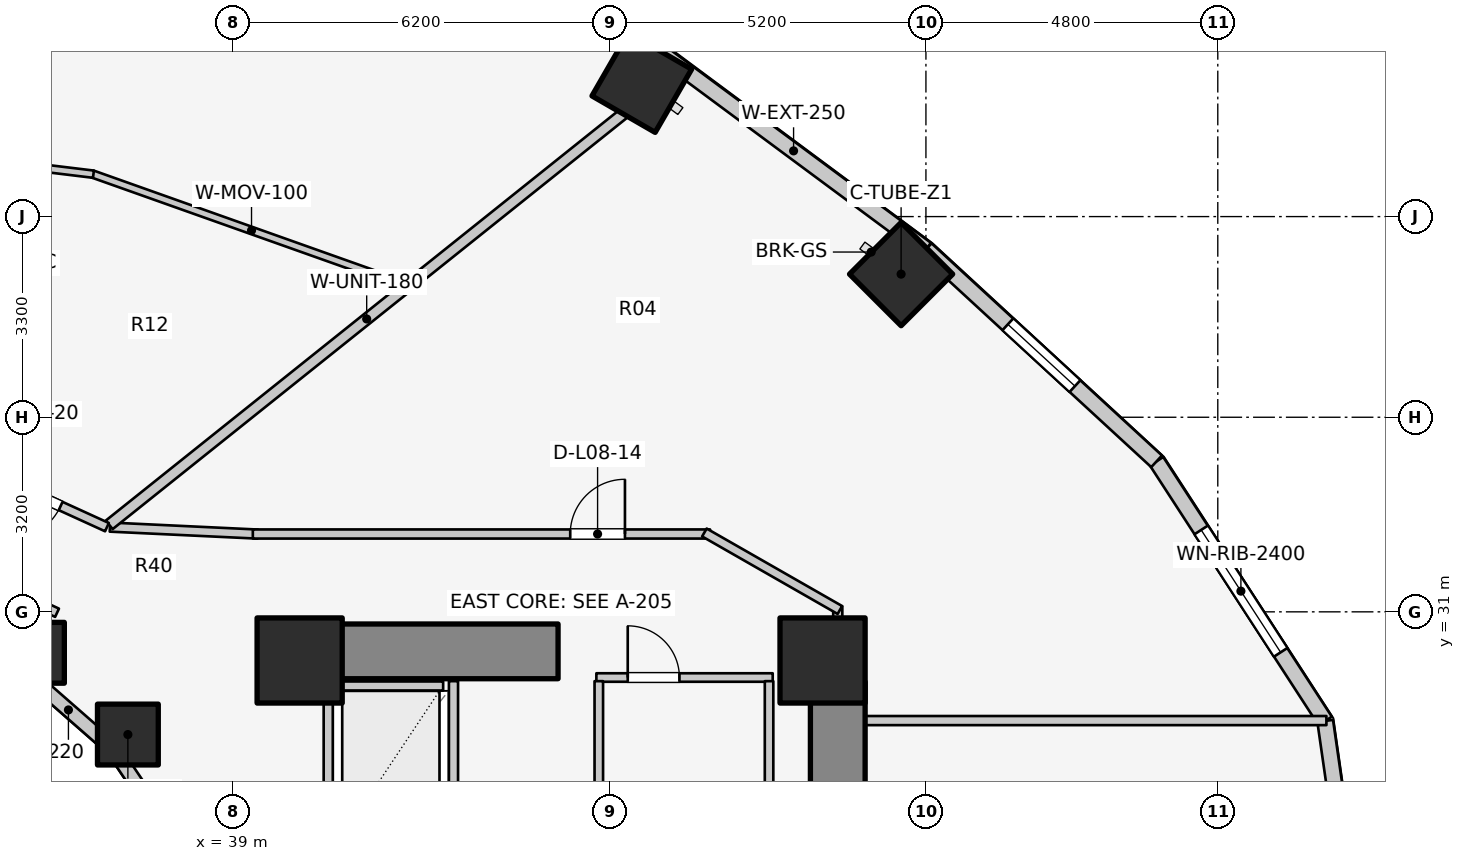
"""IFC4 building model, lengths in metres.
Left out: names, types, materials, properties, quantities, classifications, styles, units other than length and angle.
Written with IfcOpenShell. Run it as: python <this file> out.ifc"""

import sys

from ifc_helpers import new_model, si_unit, direction, frame, frame_2d, origin, origin_2d, place, context, subcontext, project, spatial, rectangle, extrude, element, fill, save


model = new_model("IFC4")
c1 = context("Model", 3, precision=1e-05, world=origin(), true_north=direction((0.0, 1.0)))
c2 = subcontext(c1, "Body", "Model", "MODEL_VIEW")
j1 = project(units=[si_unit("LENGTHUNIT", "METRE"), si_unit("PLANEANGLEUNIT", "RADIAN")], contexts=[c1])
p1 = place(None, origin())
s1 = spatial("IfcSite", under=j1, at=p1, CompositionType="ELEMENT")
p2 = place(p1, origin())
s2 = spatial("IfcBuilding", under=s1, at=p2, CompositionType="ELEMENT")
p3 = place(p2, frame((0.0, 0.0, 30.7)))
s3 = spatial("IfcBuildingStorey", under=s2, at=p3, CompositionType="ELEMENT", Elevation=30.7)
p4 = place(p3, frame((48.95, 17.05, 0.0), z_axis=(0.0, 0.0, 1.0), x_axis=(0.0, 1.0, 0.0)))
e1 = element("IfcWall", 1, at=p4, inside=s3, PredefinedType="SHEAR", context=c2, shape_type="SweptSolid", body=[
    extrude(rectangle(XDim=12.8, YDim=0.9, at=frame_2d((6.4, 0.0))), origin(), (0.0, 0.0, 1.0), 3.1),
])
p5 = place(p3, frame((39.85, 30.35, 0.0), z_axis=(0.0, 0.0, 1.0), x_axis=(1.0, 0.0, 0.0)))
e2 = element("IfcWall", 2, at=p5, inside=s3, PredefinedType="SHEAR", context=c2, shape_type="SweptSolid", body=[
    extrude(rectangle(XDim=4.5, YDim=0.9, at=frame_2d((2.25, 0.0))), origin(), (0.0, 0.0, 1.0), 3.1),
])
for number, where, z_axis, x_axis in (
    (3, (48.7, 30.2, 0.0), (0.0, 0.0, 1.0), (1.0, 0.0, 0.0)),
    (4, (40.1, 30.2, 0.0), (0.0, 0.0, 1.0), (1.0, 0.0, 0.0)),
):
    element("IfcColumn", number, at=place(p3, frame(where, z_axis=z_axis, x_axis=x_axis)), inside=s3, PredefinedType="COLUMN", context=c2, shape_type="SweptSolid", body=[
        extrude(rectangle(XDim=1.4, YDim=1.4, at=origin_2d()), origin(), (0.0, 0.0, 1.0), 3.1),
    ])
p6 = place(p3, frame((37.275, 28.982, 0.0), z_axis=(0.0, 0.0, 1.0), x_axis=(1.0, 0.0, 0.0)))
e5 = element("IfcColumn", 5, at=p6, inside=s3, PredefinedType="COLUMN", context=c2, shape_type="SweptSolid", body=[
    extrude(rectangle(XDim=1.0, YDim=1.0, at=origin_2d()), origin(), (0.0, 0.0, 1.0), 3.1),
])
p7 = place(p3, frame((49.992, 36.554, 0.0), z_axis=(0.0, 0.0, 1.0), x_axis=(0.707106781187, 0.707106781187, 0.0)))
e6 = element("IfcColumn", 6, at=p7, inside=s3, PredefinedType="COLUMN", context=c2, shape_type="SweptSolid", body=[
    extrude(rectangle(XDim=1.2, YDim=1.2, at=origin_2d()), origin(), (0.0, 0.0, 1.0), 3.1),
])
p8 = place(p3, frame((35.73, 30.327, 0.0), z_axis=(0.0, 0.0, 1.0), x_axis=(1.0, 0.0, 0.0)))
e7 = element("IfcColumn", 7, at=p8, inside=s3, PredefinedType="COLUMN", context=c2, shape_type="SweptSolid", body=[
    extrude(rectangle(XDim=1.0, YDim=1.0, at=origin_2d()), origin(), (0.0, 0.0, 1.0), 3.1),
])
p9 = place(p3, frame((45.727, 39.704, 0.0), z_axis=(0.0, 0.0, 1.0), x_axis=(0.5, 0.866025403784, 0.0)))
e8 = element("IfcColumn", 8, at=p9, inside=s3, PredefinedType="COLUMN", context=c2, shape_type="SweptSolid", body=[
    extrude(rectangle(XDim=1.2, YDim=1.2, at=origin_2d()), origin(), (0.0, 0.0, 1.0), 3.1),
])
p10 = place(p3, frame((38.166, 27.06, 0.0), z_axis=(0.0, 0.0, 1.0), x_axis=(-0.558197800898, 0.829707909492, 0.0)))
e9 = element("IfcWall", 9, at=p10, inside=s3, PredefinedType="STANDARD", context=c2, shape_type="SweptSolid", body=[
    extrude(rectangle(XDim=2.027, YDim=0.23, at=frame_2d((1.013, 0.0))), origin(), (0.0, 0.0, 1.0), 2.16),
])
p11 = place(p3, frame((37.035, 28.742, 0.0), z_axis=(0.0, 0.0, 1.0), x_axis=(-0.752576694707, 0.658504607869, 0.0)))
e10 = element("IfcWall", 10, at=p11, inside=s3, PredefinedType="STANDARD", context=c2, shape_type="SweptSolid", body=[
    extrude(rectangle(XDim=1.959, YDim=0.23, at=frame_2d((0.98, 0.0))), origin(), (0.0, 0.0, 1.0), 2.16),
])
p12 = place(p3, frame((57.86, 23.0, 0.0), z_axis=(0.0, 0.0, 1.0), x_axis=(-0.142528001686, 0.989790770181, 0.0)))
e11 = element("IfcWall", 11, at=p12, inside=s3, PredefinedType="STANDARD", context=c2, shape_type="SweptSolid", body=[
    extrude(rectangle(XDim=6.269, YDim=0.26, at=frame_2d((3.135, 0.0))), origin(), (0.0, 0.0, 1.0), 2.85),
])
p13 = place(p12, frame((2.385, 0.0, 0.75)))
e12 = element("IfcOpeningElement", 12, at=p13, cuts=e11, PredefinedType="OPENING", context=c2, shape_type="SweptSolid", body=[
    extrude(rectangle(XDim=1.5, YDim=1.6, at=frame_2d((0.75, 0.8))), frame((0.0, 0.14, 0.0), z_axis=(0.0, -1.0, 0.0), x_axis=(1.0, 0.0, 0.0)), (0.0, 0.0, 1.0), 0.28),
])
p14 = place(p3, frame((56.967, 29.205, 0.0), z_axis=(0.0, 0.0, 1.0), x_axis=(-0.544578722263, 0.838709732421, 0.0)))
e13 = element("IfcWall", 13, at=p14, inside=s3, PredefinedType="STANDARD", context=c2, shape_type="SweptSolid", body=[
    extrude(rectangle(XDim=5.092, YDim=0.26, at=frame_2d((2.546, 0.0))), origin(), (0.0, 0.0, 1.0), 2.85),
])
p15 = place(p14, frame((1.346, 0.0, 0.75)))
e14 = element("IfcOpeningElement", 14, at=p15, cuts=e13, PredefinedType="OPENING", context=c2, shape_type="SweptSolid", body=[
    extrude(rectangle(XDim=2.4, YDim=1.7, at=frame_2d((1.2, 0.85))), frame((0.0, 0.14, 0.0), z_axis=(0.0, -1.0, 0.0), x_axis=(1.0, 0.0, 0.0)), (0.0, 0.0, 1.0), 0.28),
])
p16 = place(p3, frame((54.194, 33.476, 0.0), z_axis=(0.0, 0.0, 1.0), x_axis=(-0.735655109293, 0.67735630223, 0.0)))
e15 = element("IfcWall", 15, at=p16, inside=s3, PredefinedType="STANDARD", context=c2, shape_type="SweptSolid", body=[
    extrude(rectangle(XDim=5.151, YDim=0.26, at=frame_2d((2.575, 0.0))), origin(), (0.0, 0.0, 1.0), 2.85),
])
p17 = place(p16, frame((1.825, 0.0, 0.75)))
e16 = element("IfcOpeningElement", 16, at=p17, cuts=e15, PredefinedType="OPENING", context=c2, shape_type="SweptSolid", body=[
    extrude(rectangle(XDim=1.5, YDim=1.6, at=frame_2d((0.75, 0.8))), frame((0.0, 0.14, 0.0), z_axis=(0.0, -1.0, 0.0), x_axis=(1.0, 0.0, 0.0)), (0.0, 0.0, 1.0), 0.28),
])
p18 = place(p3, frame((50.405, 36.965, 0.0), z_axis=(0.0, 0.0, 1.0), x_axis=(-0.803477531792, 0.595335078679, 0.0)))
e17 = element("IfcWall", 17, at=p18, inside=s3, PredefinedType="STANDARD", context=c2, shape_type="SweptSolid", body=[
    extrude(rectangle(XDim=5.43, YDim=0.26, at=frame_2d((2.715, 0.0))), origin(), (0.0, 0.0, 1.0), 2.85),
])
p19 = place(p3, frame((46.042, 40.197, 0.0), z_axis=(0.0, 0.0, 1.0), x_axis=(-0.919612132394, 0.39282760335, 0.0)))
e18 = element("IfcWall", 18, at=p19, inside=s3, PredefinedType="STANDARD", context=c2, shape_type="SweptSolid", body=[
    extrude(rectangle(XDim=6.209, YDim=0.26, at=frame_2d((3.105, 0.0))), origin(), (0.0, 0.0, 1.0), 2.88),
])
p20 = place(p19, frame((2.505, 0.0, 0.0)))
e19 = element("IfcOpeningElement", 19, at=p20, cuts=e18, PredefinedType="OPENING", context=c2, shape_type="SweptSolid", body=[
    extrude(rectangle(XDim=1.2, YDim=2.2, at=frame_2d((0.6, 1.1))), frame((0.0, 0.14, 0.0), z_axis=(0.0, -1.0, 0.0), x_axis=(1.0, 0.0, 0.0)), (0.0, 0.0, 1.0), 0.28),
])
p21 = place(p3, frame((40.74, 29.78, 0.0), z_axis=(0.0, 0.0, 1.0), x_axis=(1.0, 0.0, 0.0)))
e20 = element("IfcWall", 20, at=p21, inside=s3, PredefinedType="SOLIDWALL", context=c2, shape_type="SweptSolid", body=[
    extrude(rectangle(XDim=1.72, YDim=0.15, at=frame_2d((0.86, 0.0))), origin(), (0.0, 0.0, 1.0), 2.855),
])
for number, where, z_axis, x_axis in (
    (21, (40.57, 27.14, 0.0), (0.0, 0.0, 1.0), (0.0, 1.0, 0.0)),
    (22, (42.63, 27.14, 0.0), (0.0, 0.0, 1.0), (0.0, 1.0, 0.0)),
):
    element("IfcWall", number, at=place(p3, frame(where, z_axis=z_axis, x_axis=x_axis)), inside=s3, PredefinedType="SOLIDWALL", context=c2, shape_type="SweptSolid", body=[
        extrude(rectangle(XDim=2.72, YDim=0.15, at=frame_2d((1.36, 0.0))), origin(), (0.0, 0.0, 1.0), 2.855),
    ])
p22 = place(p3, frame((44.98, 29.92, 0.0), z_axis=(0.0, 0.0, 1.0), x_axis=(1.0, 0.0, 0.0)))
e23 = element("IfcWall", 23, at=p22, inside=s3, PredefinedType="PLUMBINGWALL", context=c2, shape_type="SweptSolid", body=[
    extrude(rectangle(XDim=2.9, YDim=0.14, at=frame_2d((1.45, 0.0))), origin(), (0.0, 0.0, 1.0), 2.855),
])
p23 = place(p22, frame((0.516, 0.0, 0.0)))
e24 = element("IfcOpeningElement", 24, at=p23, cuts=e23, PredefinedType="OPENING", context=c2, shape_type="SweptSolid", body=[
    extrude(rectangle(XDim=0.85, YDim=2.05, at=frame_2d((0.425, 1.025))), frame((0.0, 0.08, 0.0), z_axis=(0.0, -1.0, 0.0), x_axis=(1.0, 0.0, 0.0)), (0.0, 0.0, 1.0), 0.16),
])
for number, where, z_axis, x_axis in (
    (25, (45.02, 25.98, 0.0), (0.0, 0.0, 1.0), (0.0, 1.0, 0.0)),
    (26, (47.82, 25.98, 0.0), (0.0, 0.0, 1.0), (0.0, 1.0, 0.0)),
):
    element("IfcWall", number, at=place(p3, frame(where, z_axis=z_axis, x_axis=x_axis)), inside=s3, PredefinedType="PLUMBINGWALL", context=c2, shape_type="SweptSolid", body=[
        extrude(rectangle(XDim=3.88, YDim=0.14, at=frame_2d((1.94, 0.0))), origin(), (0.0, 0.0, 1.0), 2.855),
    ])
p24 = place(p3, frame((36.11, 30.985, 0.0), z_axis=(0.0, 0.0, 1.0), x_axis=(-0.906943449489, 0.421252393975, 0.0)))
e27 = element("IfcWall", 27, at=p24, inside=s3, PredefinedType="PARTITIONING", context=c2, shape_type="SweptSolid", body=[
    extrude(rectangle(XDim=2.186, YDim=0.15, at=frame_2d((1.093, 0.0))), origin(), (0.0, 0.0, 1.0), 2.237),
])
p25 = place(p3, frame((48.95, 29.212, 0.0), z_axis=(0.0, 0.0, 1.0), x_axis=(1.0, 0.0, 0.0)))
e28 = element("IfcWall", 28, at=p25, inside=s3, PredefinedType="PARTITIONING", context=c2, shape_type="SweptSolid", body=[
    extrude(rectangle(XDim=8.036, YDim=0.15, at=frame_2d((4.018, 0.0))), origin(), (0.0, 0.0, 1.0), 2.855),
])
p26 = place(p3, frame((48.95, 29.8, 0.0), z_axis=(0.0, 0.0, 1.0), x_axis=(0.0, 1.0, 0.0)))
e29 = element("IfcWall", 29, at=p26, inside=s3, PredefinedType="PARTITIONING", context=c2, shape_type="SweptSolid", body=[
    extrude(rectangle(XDim=1.29, YDim=0.15, at=frame_2d((0.645, 0.0))), origin(), (0.0, 0.0, 1.0), 2.069),
])
p27 = place(p3, frame((36.98, 32.394, 0.0), z_axis=(0.0, 0.0, 1.0), x_axis=(0.998877427952, -0.047369651964, 0.0)))
e30 = element("IfcWall", 30, at=p27, inside=s3, PredefinedType="PARTITIONING", context=c2, shape_type="SweptSolid", body=[
    extrude(rectangle(XDim=2.433, YDim=0.15, at=frame_2d((1.216, 0.0))), origin(), (0.0, 0.0, 1.0), 2.237),
])
p28 = place(p3, frame((39.33, 32.28, 0.0), z_axis=(0.0, 0.0, 1.0), x_axis=(1.0, 0.0, 0.0)))
e31 = element("IfcWall", 31, at=p28, inside=s3, PredefinedType="PARTITIONING", context=c2, shape_type="SweptSolid", body=[
    extrude(rectangle(XDim=7.52, YDim=0.15, at=frame_2d((3.76, 0.0))), origin(), (0.0, 0.0, 1.0), 2.237),
])
p29 = place(p28, frame((5.22, 0.0, 0.0)))
e32 = element("IfcOpeningElement", 32, at=p29, cuts=e31, PredefinedType="OPENING", context=c2, shape_type="SweptSolid", body=[
    extrude(rectangle(XDim=0.9, YDim=2.1, at=frame_2d((0.45, 1.05))), frame((0.0, 0.085, 0.0), z_axis=(0.0, -1.0, 0.0), x_axis=(1.0, 0.0, 0.0)), (0.0, 0.0, 1.0), 0.17),
])
p30 = place(p3, frame((46.757, 32.305, 0.0), z_axis=(0.0, 0.0, 1.0), x_axis=(0.867991349648, -0.496579315857, 0.0)))
e33 = element("IfcWall", 33, at=p30, inside=s3, PredefinedType="PARTITIONING", context=c2, shape_type="SweptSolid", body=[
    extrude(rectangle(XDim=2.567, YDim=0.15, at=frame_2d((1.283, 0.0))), origin(), (0.0, 0.0, 1.0), 2.069),
])
p31 = place(p3, frame((36.968, 32.431, 0.0), z_axis=(0.0, 0.0, 1.0), x_axis=(0.781055486744, 0.624461629428, 0.0)))
e34 = element("IfcWall", 34, at=p31, inside=s3, PredefinedType="PARTITIONING", context=c2, shape_type="SweptSolid", body=[
    extrude(rectangle(XDim=10.843, YDim=0.18, at=frame_2d((5.422, 0.0))), origin(), (0.0, 0.0, 1.0), 2.237),
])
p32 = place(p3, frame((41.928, 36.342, 0.0), z_axis=(0.0, 0.0, 1.0), x_axis=(-0.942369240096, 0.334574678243, 0.0)))
e35 = element("IfcWall", 35, at=p32, inside=s3, PredefinedType="MOVABLE", context=c2, shape_type="SweptSolid", body=[
    extrude(rectangle(XDim=5.559, YDim=0.12, at=frame_2d((2.779, 0.0))), origin(), (0.0, 0.0, 1.0), 2.237),
])
p33 = place(p3, frame((36.708, 38.197, 0.0), z_axis=(0.0, 0.0, 1.0), x_axis=(-0.992699076447, 0.120617343785, 0.0)))
e36 = element("IfcWall", 36, at=p33, inside=s3, PredefinedType="MOVABLE", context=c2, shape_type="SweptSolid", body=[
    extrude(rectangle(XDim=4.793, YDim=0.12, at=frame_2d((2.396, 0.0))), origin(), (0.0, 0.0, 1.0), 2.237),
])
p34 = place(p33, frame((1.922, 0.0, 0.0)))
e37 = element("IfcOpeningElement", 37, at=p34, cuts=e36, PredefinedType="OPENING", context=c2, shape_type="SweptSolid", body=[
    extrude(rectangle(XDim=0.95, YDim=2.1, at=frame_2d((0.475, 1.05))), frame((0.0, 0.07, 0.0), z_axis=(0.0, -1.0, 0.0), x_axis=(1.0, 0.0, 0.0)), (0.0, 0.0, 1.0), 0.14),
])
p35 = place(p3, frame((36.931, 32.393, 0.0), z_axis=(0.0, 0.0, 1.0), x_axis=(-0.909747571199, 0.415161843982, 0.0)))
e38 = element("IfcWall", 38, at=p35, inside=s3, PredefinedType="PARTITIONING", context=c2, shape_type="SweptSolid", body=[
    extrude(rectangle(XDim=2.625, YDim=0.15, at=frame_2d((1.312, 0.0))), origin(), (0.0, 0.0, 1.0), 2.237),
])
p36 = place(p35, frame((0.838, 0.0, 0.0)))
e39 = element("IfcOpeningElement", 39, at=p36, cuts=e38, PredefinedType="OPENING", context=c2, shape_type="SweptSolid", body=[
    extrude(rectangle(XDim=0.95, YDim=2.1, at=frame_2d((0.475, 1.05))), frame((0.0, 0.085, 0.0), z_axis=(0.0, -1.0, 0.0), x_axis=(1.0, 0.0, 0.0)), (0.0, 0.0, 1.0), 0.17),
])
p37 = place(p15, origin())
e40 = element("IfcWindow", 40, at=p37, inside=s3, PartitioningType="SINGLE_PANEL", PredefinedType="WINDOW", context=c2, shape_type="SweptSolid", body=[
    extrude(rectangle(XDim=2.4, YDim=1.7, at=frame_2d((1.2, 0.85))), frame((0.0, 0.03, 0.0), z_axis=(0.0, -1.0, 0.0), x_axis=(1.0, 0.0, 0.0)), (0.0, 0.0, 1.0), 0.06),
])
fill(e14, e40)
p38 = place(p17, origin())
e41 = element("IfcWindow", 41, at=p38, inside=s3, PartitioningType="SINGLE_PANEL", PredefinedType="WINDOW", context=c2, shape_type="SweptSolid", body=[
    extrude(rectangle(XDim=1.5, YDim=1.6, at=frame_2d((0.75, 0.8))), frame((0.0, 0.03, 0.0), z_axis=(0.0, -1.0, 0.0), x_axis=(1.0, 0.0, 0.0)), (0.0, 0.0, 1.0), 0.06),
])
fill(e16, e41)
p39 = place(p23, origin())
e42 = element("IfcDoor", 42, at=p39, inside=s3, OperationType="SINGLE_SWING_LEFT", PredefinedType="DOOR", context=c2, shape_type="SweptSolid", body=[
    extrude(rectangle(XDim=0.85, YDim=2.05, at=frame_2d((0.425, 1.025))), frame((0.0, 0.025, 0.0), z_axis=(0.0, -1.0, 0.0), x_axis=(1.0, 0.0, 0.0)), (0.0, 0.0, 1.0), 0.05),
])
fill(e24, e42)
p40 = place(p29, origin())
e43 = element("IfcDoor", 43, at=p40, inside=s3, OperationType="SINGLE_SWING_RIGHT", PredefinedType="DOOR", context=c2, shape_type="SweptSolid", body=[
    extrude(rectangle(XDim=0.9, YDim=2.1, at=frame_2d((0.45, 1.05))), frame((0.0, 0.025, 0.0), z_axis=(0.0, -1.0, 0.0), x_axis=(1.0, 0.0, 0.0)), (0.0, 0.0, 1.0), 0.05),
])
fill(e32, e43)
p41 = place(p36, origin())
e44 = element("IfcDoor", 44, at=p41, inside=s3, OperationType="SINGLE_SWING_RIGHT", PredefinedType="DOOR", context=c2, shape_type="SweptSolid", body=[
    extrude(rectangle(XDim=0.95, YDim=2.1, at=frame_2d((0.475, 1.05))), frame((0.0, 0.025, 0.0), z_axis=(0.0, -1.0, 0.0), x_axis=(1.0, 0.0, 0.0)), (0.0, 0.0, 1.0), 0.05),
])
fill(e39, e44)
save(model, sys.argv[1])
